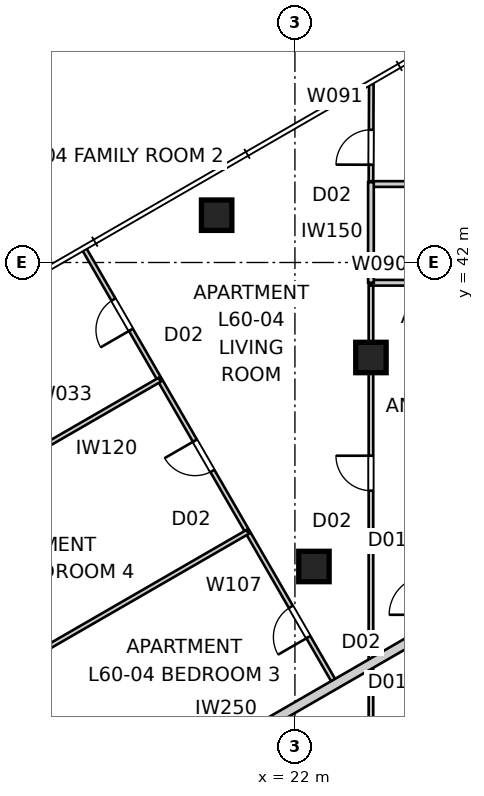
"""IFC4 building model, lengths in metres.
Left out: names, types, materials, properties, quantities, classifications, styles, units other than length and angle.
Written with IfcOpenShell. Run it as: python <this file> out.ifc"""

import sys

from ifc_helpers import new_model, si_unit, direction, frame, frame_2d, origin, origin_2d, place, context, subcontext, project, spatial, rectangle, extrude, element, fill, save


model = new_model("IFC4")
c1 = context("Model", 3, precision=1e-05, world=origin(), true_north=direction((0.0, 1.0)))
c2 = subcontext(c1, "Body", "Model", "MODEL_VIEW")
j1 = project(units=[si_unit("LENGTHUNIT", "METRE"), si_unit("PLANEANGLEUNIT", "RADIAN")], contexts=[c1])
p1 = place(None, origin())
s1 = spatial("IfcSite", under=j1, at=p1, CompositionType="ELEMENT")
p2 = place(p1, origin())
s2 = spatial("IfcBuilding", under=s1, at=p2, CompositionType="ELEMENT")
p3 = place(p2, frame((0.0, 0.0, 218.4)))
s3 = spatial("IfcBuildingStorey", under=s2, at=p3, CompositionType="ELEMENT", Elevation=218.4)
for number, where, z_axis, x_axis in (
    (1, (19.94, 43.245, 0.0), (0.0, 0.0, 1.0), (1.0, 0.0, 0.0)),
    (2, (24.0, 39.5, 0.0), (0.0, 0.0, 1.0), (1.0, 0.0, 0.0)),
    (3, (22.5, 34.0, 0.0), (0.0, 0.0, 1.0), (1.0, 0.0, 0.0)),
):
    element("IfcColumn", number, at=place(p3, frame(where, z_axis=z_axis, x_axis=x_axis)), inside=s3, PredefinedType="COLUMN", context=c2, shape_type="SweptSolid", body=[
        extrude(rectangle(XDim=0.8, YDim=0.8, at=origin_2d()), origin(), (0.0, 0.0, 1.0), 3.4),
    ])
p4 = place(p3, frame((15.889, 26.761, 0.0), z_axis=(0.0, 0.0, 1.0), x_axis=(0.866024069551, 0.500002310952, 0.0)))
e4 = element("IfcWall", 4, at=p4, inside=s3, PredefinedType="PARTITIONING", context=c2, shape_type="SweptSolid", body=[
    extrude(rectangle(XDim=10.95, YDim=0.25, at=frame_2d((5.475, 0.0))), origin(), (0.0, 0.0, 1.0), 3.25),
])
p5 = place(p3, frame((24.0, 15.422, 0.0), z_axis=(0.0, 0.0, 1.0), x_axis=(0.0, 1.0, 0.0)))
e5 = element("IfcWall", 5, at=p5, inside=s3, PredefinedType="PARTITIONING", context=c2, shape_type="SweptSolid", body=[
    extrude(rectangle(XDim=26.045, YDim=0.12, at=frame_2d((13.022, 0.0))), origin(), (0.0, 0.0, 1.0), 2.55),
])
p6 = place(p5, frame((13.139, 0.0, 0.0)))
e6 = element("IfcOpeningElement", 6, at=p6, cuts=e5, PredefinedType="OPENING", context=c2, shape_type="SweptSolid", body=[
    extrude(rectangle(XDim=0.92, YDim=2.34, at=frame_2d((0.46, 1.17))), frame((0.0, 0.07, 0.0), z_axis=(0.0, -1.0, 0.0), x_axis=(1.0, 0.0, 0.0)), (0.0, 0.0, 1.0), 0.14),
])
p7 = place(p5, frame((20.573, 0.0, 0.0)))
e7 = element("IfcOpeningElement", 7, at=p7, cuts=e5, PredefinedType="OPENING", context=c2, shape_type="SweptSolid", body=[
    extrude(rectangle(XDim=0.92, YDim=2.34, at=frame_2d((0.46, 1.17))), frame((0.0, 0.07, 0.0), z_axis=(0.0, -1.0, 0.0), x_axis=(1.0, 0.0, 0.0)), (0.0, 0.0, 1.0), 0.14),
])
p8 = place(p5, frame((0.42, 0.0, 0.0)))
e8 = element("IfcOpeningElement", 8, at=p8, cuts=e5, PredefinedType="OPENING", context=c2, shape_type="SweptSolid", body=[
    extrude(rectangle(XDim=0.92, YDim=2.34, at=frame_2d((0.46, 1.17))), frame((0.0, 0.07, 0.0), z_axis=(0.0, -1.0, 0.0), x_axis=(1.0, 0.0, 0.0)), (0.0, 0.0, 1.0), 0.14),
])
p9 = place(p3, frame((24.0, 41.467, 0.0), z_axis=(0.0, 0.0, 1.0), x_axis=(1.0, 0.0, 0.0)))
e9 = element("IfcWall", 9, at=p9, inside=s3, PredefinedType="SOLIDWALL", context=c2, shape_type="SweptSolid", body=[
    extrude(rectangle(XDim=4.82, YDim=0.15, at=frame_2d((2.41, 0.0))), origin(), (0.0, 0.0, 1.0), 3.25),
])
p10 = place(p9, frame((1.49, 0.0, 0.0)))
e10 = element("IfcOpeningElement", 10, at=p10, cuts=e9, PredefinedType="OPENING", context=c2, shape_type="SweptSolid", body=[
    extrude(rectangle(XDim=0.92, YDim=2.1, at=frame_2d((0.46, 1.05))), frame((0.0, 0.085, 0.0), z_axis=(0.0, -1.0, 0.0), x_axis=(1.0, 0.0, 0.0)), (0.0, 0.0, 1.0), 0.17),
])
p11 = place(p3, frame((24.0, 44.115, 0.0), z_axis=(0.0, 0.0, 1.0), x_axis=(0.003773202081, 0.999992881448, 0.0)))
e11 = element("IfcWall", 11, at=p11, inside=s3, PredefinedType="PARTITIONING", context=c2, shape_type="SweptSolid", body=[
    extrude(rectangle(XDim=2.588, YDim=0.12, at=frame_2d((1.294, 0.0))), origin(), (0.0, 0.0, 1.0), 3.25),
])
p12 = place(p11, frame((0.458, 0.0, 0.0)))
e12 = element("IfcOpeningElement", 12, at=p12, cuts=e11, PredefinedType="OPENING", context=c2, shape_type="SweptSolid", body=[
    extrude(rectangle(XDim=0.92, YDim=2.34, at=frame_2d((0.46, 1.17))), frame((0.0, 0.07, 0.0), z_axis=(0.0, -1.0, 0.0), x_axis=(1.0, 0.0, 0.0)), (0.0, 0.0, 1.0), 0.14),
])
p13 = place(p3, frame((29.897, 44.065, 0.0), z_axis=(0.0, 0.0, 1.0), x_axis=(-1.0, 0.0, 0.0)))
e13 = element("IfcWall", 13, at=p13, inside=s3, PredefinedType="SOLIDWALL", context=c2, shape_type="SweptSolid", body=[
    extrude(rectangle(XDim=5.897, YDim=0.15, at=frame_2d((2.949, 0.0))), origin(), (0.0, 0.0, 1.0), 3.25),
])
p14 = place(p3, frame((23.067, 30.905, 0.0), z_axis=(0.0, 0.0, 1.0), x_axis=(-0.499999220117, 0.86602585405, 0.0)))
e14 = element("IfcWall", 14, at=p14, inside=s3, PredefinedType="PARTITIONING", context=c2, shape_type="SweptSolid", body=[
    extrude(rectangle(XDim=13.21, YDim=0.12, at=frame_2d((6.605, 0.0))), origin(), (0.0, 0.0, 1.0), 3.25),
])
p15 = place(p14, frame((6.478, 0.0, 0.0)))
e15 = element("IfcOpeningElement", 15, at=p15, cuts=e14, PredefinedType="OPENING", context=c2, shape_type="SweptSolid", body=[
    extrude(rectangle(XDim=0.92, YDim=2.34, at=frame_2d((0.46, 1.17))), frame((0.0, 0.07, 0.0), z_axis=(0.0, -1.0, 0.0), x_axis=(1.0, 0.0, 0.0)), (0.0, 0.0, 1.0), 0.14),
])
p16 = place(p14, frame((1.427, 0.0, 0.0)))
e16 = element("IfcOpeningElement", 16, at=p16, cuts=e14, PredefinedType="OPENING", context=c2, shape_type="SweptSolid", body=[
    extrude(rectangle(XDim=0.92, YDim=2.34, at=frame_2d((0.46, 1.17))), frame((0.0, 0.07, 0.0), z_axis=(0.0, -1.0, 0.0), x_axis=(1.0, 0.0, 0.0)), (0.0, 0.0, 1.0), 0.14),
])
p17 = place(p14, frame((10.765, 0.0, 0.0)))
e17 = element("IfcOpeningElement", 17, at=p17, cuts=e14, PredefinedType="OPENING", context=c2, shape_type="SweptSolid", body=[
    extrude(rectangle(XDim=0.92, YDim=2.34, at=frame_2d((0.46, 1.17))), frame((0.0, 0.07, 0.0), z_axis=(0.0, -1.0, 0.0), x_axis=(1.0, 0.0, 0.0)), (0.0, 0.0, 1.0), 0.14),
])
p18 = place(p3, frame((24.0, 44.115, 0.0), z_axis=(0.0, 0.0, 1.0), x_axis=(0.0, -1.0, 0.0)))
e18 = element("IfcWall", 18, at=p18, inside=s3, PredefinedType="SOLIDWALL", context=c2, shape_type="SweptSolid", body=[
    extrude(rectangle(XDim=2.648, YDim=0.15, at=frame_2d((1.324, 0.0))), origin(), (0.0, 0.0, 1.0), 3.25),
])
p19 = place(p3, frame((13.612, 30.786, 0.0), z_axis=(0.0, 0.0, 1.0), x_axis=(0.866032284491, 0.499988082077, 0.0)))
e19 = element("IfcWall", 19, at=p19, inside=s3, PredefinedType="PARTITIONING", context=c2, shape_type="SweptSolid", body=[
    extrude(rectangle(XDim=8.248, YDim=0.12, at=frame_2d((4.124, 0.0))), origin(), (0.0, 0.0, 1.0), 3.25),
])
p20 = place(p3, frame((14.763, 36.792, 0.0), z_axis=(0.0, 0.0, 1.0), x_axis=(0.86603819212, 0.4999778493, 0.0)))
e20 = element("IfcWall", 20, at=p20, inside=s3, PredefinedType="PARTITIONING", context=c2, shape_type="SweptSolid", body=[
    extrude(rectangle(XDim=4.248, YDim=0.12, at=frame_2d((2.124, 0.0))), origin(), (0.0, 0.0, 1.0), 3.25),
])
p21 = place(p7, origin())
e21 = element("IfcDoor", 21, at=p21, inside=s3, OperationType="SINGLE_SWING_RIGHT", PredefinedType="DOOR", context=c2, shape_type="SweptSolid", body=[
    extrude(rectangle(XDim=0.92, YDim=2.34, at=frame_2d((0.46, 1.17))), frame((0.0, 0.025, 0.0), z_axis=(0.0, -1.0, 0.0), x_axis=(1.0, 0.0, 0.0)), (0.0, 0.0, 1.0), 0.05),
])
fill(e7, e21)
p22 = place(p15, origin())
e22 = element("IfcDoor", 22, at=p22, inside=s3, OperationType="SINGLE_SWING_RIGHT", PredefinedType="DOOR", context=c2, shape_type="SweptSolid", body=[
    extrude(rectangle(XDim=0.92, YDim=2.34, at=frame_2d((0.46, 1.17))), frame((0.0, 0.025, 0.0), z_axis=(0.0, -1.0, 0.0), x_axis=(1.0, 0.0, 0.0)), (0.0, 0.0, 1.0), 0.05),
])
fill(e15, e22)
p23 = place(p16, origin())
e23 = element("IfcDoor", 23, at=p23, inside=s3, OperationType="SINGLE_SWING_LEFT", PredefinedType="DOOR", context=c2, shape_type="SweptSolid", body=[
    extrude(rectangle(XDim=0.92, YDim=2.34, at=frame_2d((0.46, 1.17))), frame((0.0, 0.025, 0.0), z_axis=(0.0, -1.0, 0.0), x_axis=(1.0, 0.0, 0.0)), (0.0, 0.0, 1.0), 0.05),
])
fill(e16, e23)
p24 = place(p17, origin())
e24 = element("IfcDoor", 24, at=p24, inside=s3, OperationType="SINGLE_SWING_LEFT", PredefinedType="DOOR", context=c2, shape_type="SweptSolid", body=[
    extrude(rectangle(XDim=0.92, YDim=2.34, at=frame_2d((0.46, 1.17))), frame((0.0, 0.025, 0.0), z_axis=(0.0, -1.0, 0.0), x_axis=(1.0, 0.0, 0.0)), (0.0, 0.0, 1.0), 0.05),
])
fill(e17, e24)
p25 = place(p12, origin())
e25 = element("IfcDoor", 25, at=p25, inside=s3, OperationType="SINGLE_SWING_LEFT", PredefinedType="DOOR", context=c2, shape_type="SweptSolid", body=[
    extrude(rectangle(XDim=0.92, YDim=2.34, at=frame_2d((0.46, 1.17))), frame((0.0, 0.025, 0.0), z_axis=(0.0, -1.0, 0.0), x_axis=(1.0, 0.0, 0.0)), (0.0, 0.0, 1.0), 0.05),
])
fill(e12, e25)
save(model, sys.argv[1])
